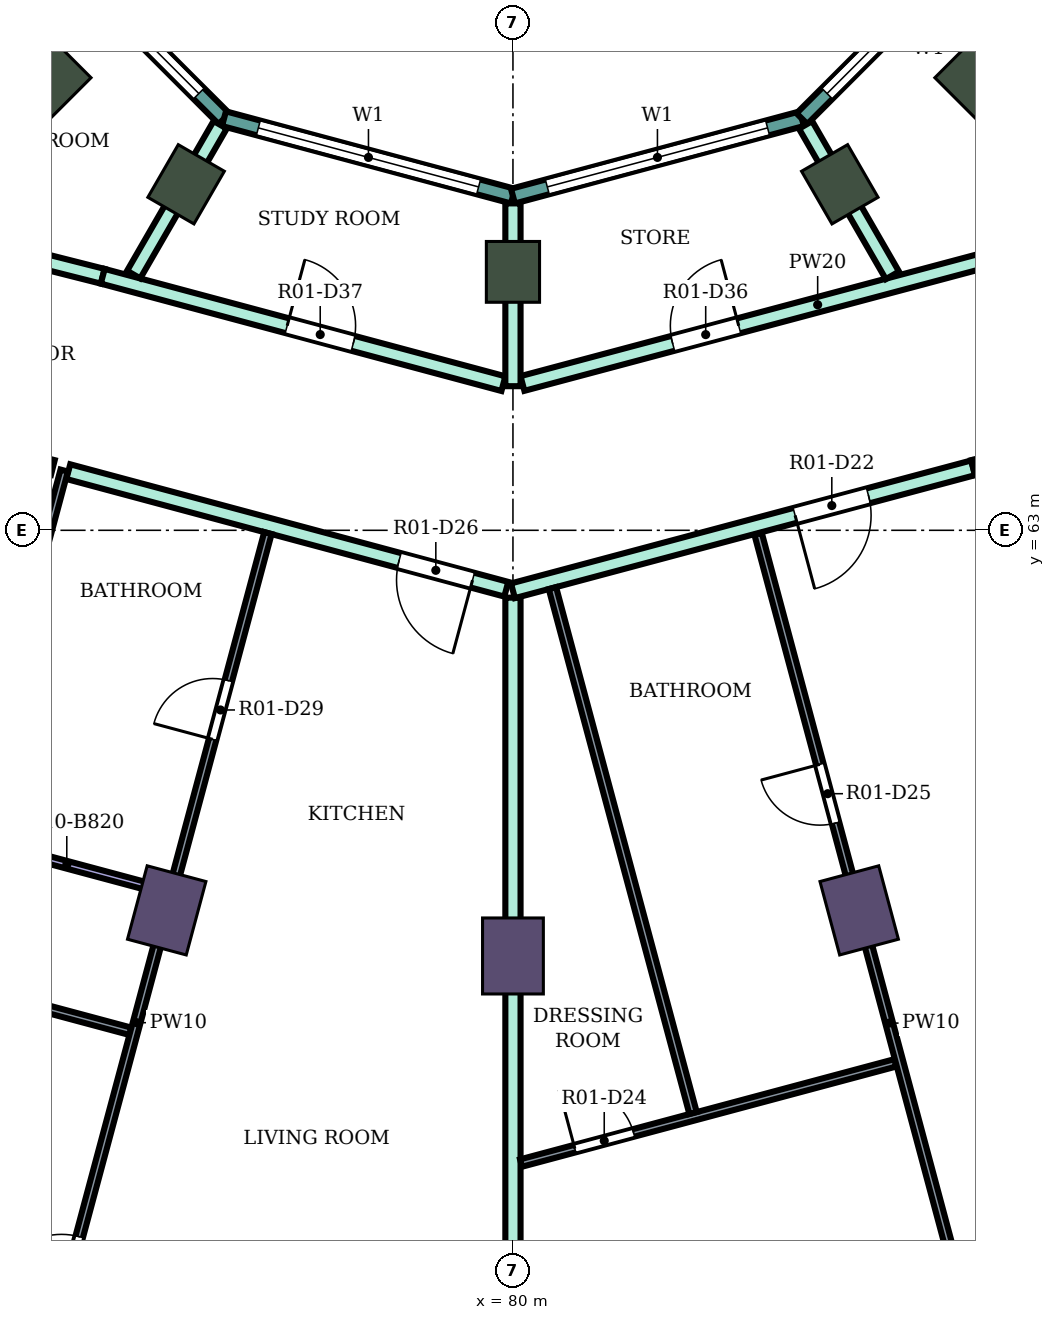
"""IFC4 building model, lengths in metres.
Left out: names, types, materials, properties, quantities, classifications, styles, units other than length and angle.
Written with IfcOpenShell. Run it as: python <this file> out.ifc"""

import sys

from ifc_helpers import new_model, si_unit, direction, frame, frame_2d, origin, origin_2d, place, context, subcontext, project, spatial, rectangle, extrude, element, fill, save


model = new_model("IFC4")
c1 = context("Model", 3, precision=1e-05, world=origin(), true_north=direction((0.0, 1.0)))
c2 = subcontext(c1, "Body", "Model", "MODEL_VIEW")
j1 = project(units=[si_unit("LENGTHUNIT", "METRE"), si_unit("PLANEANGLEUNIT", "RADIAN")], contexts=[c1])
p1 = place(None, origin())
s1 = spatial("IfcSite", under=j1, at=p1, CompositionType="ELEMENT")
p2 = place(p1, origin())
s2 = spatial("IfcBuilding", under=s1, at=p2, CompositionType="ELEMENT")
p3 = place(p2, frame((0.0, 0.0, 161.8)))
s3 = spatial("IfcBuildingStorey", under=s2, at=p3, CompositionType="ELEMENT", Elevation=161.8)
for number, where, z_axis, x_axis in (
    (1, (75.445, 58.0, 0.0), (0.0, 0.0, 1.0), (-0.259, -0.966, 0.0)),
    (2, (80.0, 57.4, 0.0), (0.0, 0.0, 1.0), (0.0, -1.0, 0.0)),
    (3, (84.555, 58.0, 0.0), (0.0, 0.0, 1.0), (0.259, -0.966, 0.0)),
):
    element("IfcColumn", number, at=place(p3, frame(where, z_axis=z_axis, x_axis=x_axis)), inside=s3, PredefinedType="COLUMN", context=c2, shape_type="SweptSolid", body=[
        extrude(rectangle(XDim=1.0, YDim=0.8, at=origin_2d()), origin(), (0.0, 0.0, 1.0), 4.1),
    ])
for number, where, z_axis, x_axis in (
    (4, (73.919, 68.919, 0.0), (0.0, 0.0, 1.0), (-0.707, -0.707, 0.0)),
    (5, (75.7, 67.552, 0.0), (0.0, 0.0, 1.0), (-0.5, -0.866, 0.0)),
    (6, (80.0, 66.4, 0.0), (0.0, 0.0, 1.0), (0.0, -1.0, 0.0)),
    (7, (84.3, 67.552, 0.0), (0.0, 0.0, 1.0), (0.5, -0.866, 0.0)),
    (8, (86.081, 68.919, 0.0), (0.0, 0.0, 1.0), (0.707, -0.707, 0.0)),
):
    element("IfcColumn", number, at=place(p3, frame(where, z_axis=z_axis, x_axis=x_axis)), inside=s3, PredefinedType="COLUMN", context=c2, shape_type="SweptSolid", body=[
        extrude(rectangle(XDim=0.8, YDim=0.7, at=origin_2d()), origin(), (0.0, 0.0, 1.0), 4.1),
    ])
p4 = place(p3, frame((73.415, 71.198, 0.0), z_axis=(0.0, 0.0, 1.0), x_axis=(0.707106781187, -0.707106781187, 0.0)))
e9 = element("IfcWall", 9, at=p4, inside=s3, PredefinedType="NOTDEFINED", context=c2, shape_type="SweptSolid", body=[
    extrude(rectangle(XDim=3.936, YDim=0.2, at=frame_2d((1.968, 0.0))), origin(), (0.0, 0.0, 1.0), 4.1),
])
p5 = place(p4, frame((0.468, 0.0, 0.9)))
e10 = element("IfcOpeningElement", 10, at=p5, cuts=e9, PredefinedType="OPENING", context=c2, shape_type="SweptSolid", body=[
    extrude(rectangle(XDim=3.0, YDim=2.3, at=frame_2d((1.5, 1.15))), frame((0.0, 0.11, 0.0), z_axis=(0.0, -1.0, 0.0), x_axis=(1.0, 0.0, 0.0)), (0.0, 0.0, 1.0), 0.22),
])
p6 = place(p3, frame((76.198, 68.415, 0.0), z_axis=(0.0, 0.0, 1.0), x_axis=(0.965933654434, -0.258789828301, 0.0)))
e11 = element("IfcWall", 11, at=p6, inside=s3, PredefinedType="NOTDEFINED", context=c2, shape_type="SweptSolid", body=[
    extrude(rectangle(XDim=3.936, YDim=0.2, at=frame_2d((1.968, 0.0))), origin(), (0.0, 0.0, 1.0), 4.1),
])
p7 = place(p6, frame((0.468, 0.0, 0.9)))
e12 = element("IfcOpeningElement", 12, at=p7, cuts=e11, PredefinedType="OPENING", context=c2, shape_type="SweptSolid", body=[
    extrude(rectangle(XDim=3.0, YDim=2.3, at=frame_2d((1.5, 1.15))), frame((0.0, 0.11, 0.0), z_axis=(0.0, -1.0, 0.0), x_axis=(1.0, 0.0, 0.0)), (0.0, 0.0, 1.0), 0.22),
])
p8 = place(p3, frame((80.0, 67.396, 0.0), z_axis=(0.0, 0.0, 1.0), x_axis=(0.965933654434, 0.258789828301, 0.0)))
e13 = element("IfcWall", 13, at=p8, inside=s3, PredefinedType="NOTDEFINED", context=c2, shape_type="SweptSolid", body=[
    extrude(rectangle(XDim=3.936, YDim=0.2, at=frame_2d((1.968, 0.0))), origin(), (0.0, 0.0, 1.0), 4.1),
])
p9 = place(p8, frame((0.468, 0.0, 0.9)))
e14 = element("IfcOpeningElement", 14, at=p9, cuts=e13, PredefinedType="OPENING", context=c2, shape_type="SweptSolid", body=[
    extrude(rectangle(XDim=3.0, YDim=2.3, at=frame_2d((1.5, 1.15))), frame((0.0, 0.11, 0.0), z_axis=(0.0, -1.0, 0.0), x_axis=(1.0, 0.0, 0.0)), (0.0, 0.0, 1.0), 0.22),
])
p10 = place(p3, frame((83.802, 68.415, 0.0), z_axis=(0.0, 0.0, 1.0), x_axis=(0.707106781187, 0.707106781187, 0.0)))
e15 = element("IfcWall", 15, at=p10, inside=s3, PredefinedType="NOTDEFINED", context=c2, shape_type="SweptSolid", body=[
    extrude(rectangle(XDim=3.936, YDim=0.2, at=frame_2d((1.968, 0.0))), origin(), (0.0, 0.0, 1.0), 4.1),
])
p11 = place(p10, frame((0.468, 0.0, 0.9)))
e16 = element("IfcOpeningElement", 16, at=p11, cuts=e15, PredefinedType="OPENING", context=c2, shape_type="SweptSolid", body=[
    extrude(rectangle(XDim=3.0, YDim=2.3, at=frame_2d((1.5, 1.15))), frame((0.0, 0.11, 0.0), z_axis=(0.0, -1.0, 0.0), x_axis=(1.0, 0.0, 0.0)), (0.0, 0.0, 1.0), 0.22),
])
p12 = place(p3, frame((68.2, 65.28, 0.0), z_axis=(0.0, 0.0, 1.0), x_axis=(0.969450596516, -0.245286650503, 0.0)))
e17 = element("IfcWall", 17, at=p12, inside=s3, PredefinedType="PARTITIONING", context=c2, shape_type="SweptSolid", body=[
    extrude(rectangle(XDim=5.928, YDim=0.2, at=frame_2d((2.964, 0.0))), origin(), (0.0, 0.0, 1.0), 3.65),
])
p13 = place(p3, frame((72.1, 66.975, 0.0), z_axis=(0.0, 0.0, 1.0), x_axis=(0.969471314457, -0.245204752086, 0.0)))
e18 = element("IfcWall", 18, at=p13, inside=s3, PredefinedType="PARTITIONING", context=c2, shape_type="SweptSolid", body=[
    extrude(rectangle(XDim=2.582, YDim=0.2, at=frame_2d((1.291, 0.0))), origin(), (0.0, 0.0, 1.0), 3.65),
])
p14 = place(p13, frame((0.841, 0.0, 0.0)))
e19 = element("IfcOpeningElement", 19, at=p14, cuts=e18, PredefinedType="OPENING", context=c2, shape_type="SweptSolid", body=[
    extrude(rectangle(XDim=0.9, YDim=2.1, at=frame_2d((0.45, 1.05))), frame((0.0, 0.11, 0.0), z_axis=(0.0, -1.0, 0.0), x_axis=(1.0, 0.0, 0.0)), (0.0, 0.0, 1.0), 0.22),
])
p15 = place(p3, frame((74.15, 63.772, 0.0), z_axis=(0.0, 0.0, 1.0), x_axis=(0.965807109237, -0.259261697417, 0.0)))
e20 = element("IfcWall", 20, at=p15, inside=s3, PredefinedType="PARTITIONING", context=c2, shape_type="SweptSolid", body=[
    extrude(rectangle(XDim=5.967, YDim=0.2, at=frame_2d((2.983, 0.0))), origin(), (0.0, 0.0, 1.0), 3.65),
])
p16 = place(p15, frame((4.507, 0.0, 0.0)))
e21 = element("IfcOpeningElement", 21, at=p16, cuts=e20, PredefinedType="OPENING", context=c2, shape_type="SweptSolid", body=[
    extrude(rectangle(XDim=1.0, YDim=2.1, at=frame_2d((0.5, 1.05))), frame((0.0, 0.11, 0.0), z_axis=(0.0, -1.0, 0.0), x_axis=(1.0, 0.0, 0.0)), (0.0, 0.0, 1.0), 0.22),
])
p17 = place(p3, frame((74.603, 66.342, 0.0), z_axis=(0.0, 0.0, 1.0), x_axis=(0.965920893652, -0.258837453254, 0.0)))
e22 = element("IfcWall", 22, at=p17, inside=s3, PredefinedType="PARTITIONING", context=c2, shape_type="SweptSolid", body=[
    extrude(rectangle(XDim=5.458, YDim=0.2, at=frame_2d((2.729, 0.0))), origin(), (0.0, 0.0, 1.0), 3.65),
])
p18 = place(p17, frame((2.512, 0.0, 0.0)))
e23 = element("IfcOpeningElement", 23, at=p18, cuts=e22, PredefinedType="OPENING", context=c2, shape_type="SweptSolid", body=[
    extrude(rectangle(XDim=0.9, YDim=2.1, at=frame_2d((0.45, 1.05))), frame((0.0, 0.11, 0.0), z_axis=(0.0, -1.0, 0.0), x_axis=(1.0, 0.0, 0.0)), (0.0, 0.0, 1.0), 0.22),
])
p19 = place(p3, frame((75.01, 66.364, 0.0), z_axis=(0.0, 0.0, 1.0), x_axis=(0.50017749597, 0.865922902183, 0.0)))
e24 = element("IfcWall", 24, at=p19, inside=s3, PredefinedType="PARTITIONING", context=c2, shape_type="SweptSolid", body=[
    extrude(rectangle(XDim=2.276, YDim=0.2, at=frame_2d((1.138, 0.0))), origin(), (0.0, 0.0, 1.0), 3.65),
])
p20 = place(p3, frame((80.125, 64.932, 0.0), z_axis=(0.0, 0.0, 1.0), x_axis=(0.966236955806, 0.257655089674, 0.0)))
e25 = element("IfcWall", 25, at=p20, inside=s3, PredefinedType="PARTITIONING", context=c2, shape_type="SweptSolid", body=[
    extrude(rectangle(XDim=8.039, YDim=0.2, at=frame_2d((4.02, 0.0))), origin(), (0.0, 0.0, 1.0), 3.65),
])
p21 = place(p20, frame((6.298, 0.0, 0.0)))
e26 = element("IfcOpeningElement", 26, at=p21, cuts=e25, PredefinedType="OPENING", context=c2, shape_type="SweptSolid", body=[
    extrude(rectangle(XDim=0.9, YDim=2.1, at=frame_2d((0.45, 1.05))), frame((0.0, 0.11, 0.0), z_axis=(0.0, -1.0, 0.0), x_axis=(1.0, 0.0, 0.0)), (0.0, 0.0, 1.0), 0.22),
])
p22 = place(p20, frame((2.045, 0.0, 0.0)))
e27 = element("IfcOpeningElement", 27, at=p22, cuts=e25, PredefinedType="OPENING", context=c2, shape_type="SweptSolid", body=[
    extrude(rectangle(XDim=0.9, YDim=2.1, at=frame_2d((0.45, 1.05))), frame((0.0, 0.11, 0.0), z_axis=(0.0, -1.0, 0.0), x_axis=(1.0, 0.0, 0.0)), (0.0, 0.0, 1.0), 0.22),
])
p23 = place(p3, frame((80.0, 51.8, 0.0), z_axis=(0.0, 0.0, 1.0), x_axis=(0.0, 1.0, 0.0)))
e28 = element("IfcWall", 28, at=p23, inside=s3, PredefinedType="PARTITIONING", context=c2, shape_type="SweptSolid", body=[
    extrude(rectangle(XDim=10.314, YDim=0.2, at=frame_2d((5.157, 0.0))), origin(), (0.0, 0.0, 1.0), 3.65),
])
p24 = place(p3, frame((80.0, 62.205, 0.0), z_axis=(0.0, 0.0, 1.0), x_axis=(0.966104192593, 0.258152453124, 0.0)))
e29 = element("IfcWall", 29, at=p24, inside=s3, PredefinedType="PARTITIONING", context=c2, shape_type="SweptSolid", body=[
    extrude(rectangle(XDim=6.266, YDim=0.2, at=frame_2d((3.133, 0.0))), origin(), (0.0, 0.0, 1.0), 3.65),
])
p25 = place(p24, frame((3.842, 0.0, 0.0)))
e30 = element("IfcOpeningElement", 30, at=p25, cuts=e29, PredefinedType="OPENING", context=c2, shape_type="SweptSolid", body=[
    extrude(rectangle(XDim=1.0, YDim=2.1, at=frame_2d((0.5, 1.05))), frame((0.0, 0.11, 0.0), z_axis=(0.0, -1.0, 0.0), x_axis=(1.0, 0.0, 0.0)), (0.0, 0.0, 1.0), 0.22),
])
p26 = place(p3, frame((80.0, 64.896, 0.0), z_axis=(0.0, 0.0, 1.0), x_axis=(0.0, 1.0, 0.0)))
e31 = element("IfcWall", 31, at=p26, inside=s3, PredefinedType="PARTITIONING", context=c2, shape_type="SweptSolid", body=[
    extrude(rectangle(XDim=2.405, YDim=0.2, at=frame_2d((1.203, 0.0))), origin(), (0.0, 0.0, 1.0), 3.65),
])
p27 = place(p3, frame((83.85, 68.333, 0.0), z_axis=(0.0, 0.0, 1.0), x_axis=(0.499953638813, -0.866052168773, 0.0)))
e32 = element("IfcWall", 32, at=p27, inside=s3, PredefinedType="PARTITIONING", context=c2, shape_type="SweptSolid", body=[
    extrude(rectangle(XDim=2.285, YDim=0.2, at=frame_2d((1.143, 0.0))), origin(), (0.0, 0.0, 1.0), 3.65),
])
p28 = place(p3, frame((86.053, 63.826, 0.0), z_axis=(0.0, 0.0, 1.0), x_axis=(0.969490004987, 0.245130843083, 0.0)))
e33 = element("IfcWall", 33, at=p28, inside=s3, PredefinedType="PARTITIONING", context=c2, shape_type="SweptSolid", body=[
    extrude(rectangle(XDim=5.908, YDim=0.2, at=frame_2d((2.954, 0.0))), origin(), (0.0, 0.0, 1.0), 3.65),
])
p29 = place(p3, frame((70.088, 57.717, 0.0), z_axis=(0.0, 0.0, 1.0), x_axis=(0.965906836082, -0.258889907124, 0.0)))
e34 = element("IfcWall", 34, at=p29, inside=s3, PredefinedType="PARTITIONING", context=c2, shape_type="SweptSolid", body=[
    extrude(rectangle(XDim=5.051, YDim=0.1, at=frame_2d((2.525, 0.0))), origin(), (0.0, 0.0, 1.0), 3.65),
])
p30 = place(p29, frame((2.121, 0.0, 0.0)))
e35 = element("IfcOpeningElement", 35, at=p30, cuts=e34, PredefinedType="OPENING", context=c2, shape_type="SweptSolid", body=[
    extrude(rectangle(XDim=0.8, YDim=2.1, at=frame_2d((0.4, 1.05))), frame((0.0, 0.06, 0.0), z_axis=(0.0, -1.0, 0.0), x_axis=(1.0, 0.0, 0.0)), (0.0, 0.0, 1.0), 0.12),
])
p31 = place(p3, frame((72.815, 59.004, 0.0), z_axis=(0.0, 0.0, 1.0), x_axis=(0.25878292514, 0.96593550388, 0.0)))
e36 = element("IfcWall", 36, at=p31, inside=s3, PredefinedType="PARTITIONING", context=c2, shape_type="SweptSolid", body=[
    extrude(rectangle(XDim=4.95, YDim=0.1, at=frame_2d((2.475, 0.0))), origin(), (0.0, 0.0, 1.0), 3.65),
])
p32 = place(p3, frame((72.802, 58.956, 0.0), z_axis=(0.0, 0.0, 1.0), x_axis=(0.965887802097, -0.258960911647, 0.0)))
e37 = element("IfcWall", 37, at=p32, inside=s3, PredefinedType="PARTITIONING", context=c2, shape_type="SweptSolid", body=[
    extrude(rectangle(XDim=2.75, YDim=0.1, at=frame_2d((1.375, 0.0))), origin(), (0.0, 0.0, 1.0), 3.28),
])
p33 = place(p3, frame((73.322, 50.081, 0.0), z_axis=(0.0, 0.0, 1.0), x_axis=(0.258982801816, 0.965881932931, 0.0)))
e38 = element("IfcWall", 38, at=p33, inside=s3, PredefinedType="PARTITIONING", context=c2, shape_type="SweptSolid", body=[
    extrude(rectangle(XDim=13.338, YDim=0.1, at=frame_2d((6.669, 0.0))), origin(), (0.0, 0.0, 1.0), 3.65),
])
p34 = place(p33, frame((2.854, 0.0, 0.0)))
e39 = element("IfcOpeningElement", 39, at=p34, cuts=e38, PredefinedType="OPENING", context=c2, shape_type="SweptSolid", body=[
    extrude(rectangle(XDim=0.9, YDim=2.1, at=frame_2d((0.45, 1.05))), frame((0.0, 0.06, 0.0), z_axis=(0.0, -1.0, 0.0), x_axis=(1.0, 0.0, 0.0)), (0.0, 0.0, 1.0), 0.12),
])
p35 = place(p33, frame((10.528, 0.0, 0.0)))
e40 = element("IfcOpeningElement", 40, at=p35, cuts=e38, PredefinedType="OPENING", context=c2, shape_type="SweptSolid", body=[
    extrude(rectangle(XDim=0.8, YDim=2.1, at=frame_2d((0.4, 1.05))), frame((0.0, 0.06, 0.0), z_axis=(0.0, -1.0, 0.0), x_axis=(1.0, 0.0, 0.0)), (0.0, 0.0, 1.0), 0.12),
])
p36 = place(p3, frame((80.106, 54.676, 0.0), z_axis=(0.0, 0.0, 1.0), x_axis=(0.965976901679, 0.258628353863, 0.0)))
e41 = element("IfcWall", 41, at=p36, inside=s3, PredefinedType="PARTITIONING", context=c2, shape_type="SweptSolid", body=[
    extrude(rectangle(XDim=5.097, YDim=0.1, at=frame_2d((2.549, 0.0))), origin(), (0.0, 0.0, 1.0), 3.65),
])
p37 = place(p36, frame((0.733, 0.0, 0.0)))
e42 = element("IfcOpeningElement", 42, at=p37, cuts=e41, PredefinedType="OPENING", context=c2, shape_type="SweptSolid", body=[
    extrude(rectangle(XDim=0.8, YDim=2.1, at=frame_2d((0.4, 1.05))), frame((0.0, 0.06, 0.0), z_axis=(0.0, -1.0, 0.0), x_axis=(1.0, 0.0, 0.0)), (0.0, 0.0, 1.0), 0.12),
])
p38 = place(p3, frame((80.519, 62.239, 0.0), z_axis=(0.0, 0.0, 1.0), x_axis=(0.25878046533, -0.965936162882, 0.0)))
e43 = element("IfcWall", 43, at=p38, inside=s3, PredefinedType="PARTITIONING", context=c2, shape_type="SweptSolid", body=[
    extrude(rectangle(XDim=7.149, YDim=0.1, at=frame_2d((3.575, 0.0))), origin(), (0.0, 0.0, 1.0), 3.65),
])
p39 = place(p3, frame((83.225, 62.954, 0.0), z_axis=(0.0, 0.0, 1.0), x_axis=(0.258715941946, -0.965953446799, 0.0)))
e44 = element("IfcWall", 44, at=p39, inside=s3, PredefinedType="PARTITIONING", context=c2, shape_type="SweptSolid", body=[
    extrude(rectangle(XDim=13.328, YDim=0.1, at=frame_2d((6.664, 0.0))), origin(), (0.0, 0.0, 1.0), 3.65),
])
p40 = place(p39, frame((9.784, 0.0, 0.0)))
e45 = element("IfcOpeningElement", 45, at=p40, cuts=e44, PredefinedType="OPENING", context=c2, shape_type="SweptSolid", body=[
    extrude(rectangle(XDim=0.9, YDim=2.1, at=frame_2d((0.45, 1.05))), frame((0.0, 0.06, 0.0), z_axis=(0.0, -1.0, 0.0), x_axis=(1.0, 0.0, 0.0)), (0.0, 0.0, 1.0), 0.12),
])
p41 = place(p39, frame((3.14, 0.0, 0.0)))
e46 = element("IfcOpeningElement", 46, at=p41, cuts=e44, PredefinedType="OPENING", context=c2, shape_type="SweptSolid", body=[
    extrude(rectangle(XDim=0.8, YDim=2.1, at=frame_2d((0.4, 1.05))), frame((0.0, 0.06, 0.0), z_axis=(0.0, -1.0, 0.0), x_axis=(1.0, 0.0, 0.0)), (0.0, 0.0, 1.0), 0.12),
])
p42 = place(p5, origin())
e47 = element("IfcWindow", 47, at=p42, inside=s3, PartitioningType="SINGLE_PANEL", PredefinedType="WINDOW", context=c2, shape_type="SweptSolid", body=[
    extrude(rectangle(XDim=3.0, YDim=2.3, at=frame_2d((1.5, 1.15))), frame((0.0, 0.03, 0.0), z_axis=(0.0, -1.0, 0.0), x_axis=(1.0, 0.0, 0.0)), (0.0, 0.0, 1.0), 0.06),
])
fill(e10, e47)
p43 = place(p7, origin())
e48 = element("IfcWindow", 48, at=p43, inside=s3, PartitioningType="SINGLE_PANEL", PredefinedType="WINDOW", context=c2, shape_type="SweptSolid", body=[
    extrude(rectangle(XDim=3.0, YDim=2.3, at=frame_2d((1.5, 1.15))), frame((0.0, 0.03, 0.0), z_axis=(0.0, -1.0, 0.0), x_axis=(1.0, 0.0, 0.0)), (0.0, 0.0, 1.0), 0.06),
])
fill(e12, e48)
p44 = place(p9, origin())
e49 = element("IfcWindow", 49, at=p44, inside=s3, PartitioningType="SINGLE_PANEL", PredefinedType="WINDOW", context=c2, shape_type="SweptSolid", body=[
    extrude(rectangle(XDim=3.0, YDim=2.3, at=frame_2d((1.5, 1.15))), frame((0.0, 0.03, 0.0), z_axis=(0.0, -1.0, 0.0), x_axis=(1.0, 0.0, 0.0)), (0.0, 0.0, 1.0), 0.06),
])
fill(e14, e49)
p45 = place(p11, origin())
e50 = element("IfcWindow", 50, at=p45, inside=s3, PartitioningType="SINGLE_PANEL", PredefinedType="WINDOW", context=c2, shape_type="SweptSolid", body=[
    extrude(rectangle(XDim=3.0, YDim=2.3, at=frame_2d((1.5, 1.15))), frame((0.0, 0.03, 0.0), z_axis=(0.0, -1.0, 0.0), x_axis=(1.0, 0.0, 0.0)), (0.0, 0.0, 1.0), 0.06),
])
fill(e16, e50)
p46 = place(p25, frame((1.0, 0.0, 0.0), z_axis=(0.0, 0.0, 1.0), x_axis=(-1.0, 0.0, 0.0)))
e51 = element("IfcDoor", 51, at=p46, inside=s3, OperationType="SINGLE_SWING_RIGHT", PredefinedType="DOOR", context=c2, shape_type="SweptSolid", body=[
    extrude(rectangle(XDim=1.0, YDim=2.1, at=frame_2d((0.5, 1.05))), frame((0.0, 0.025, 0.0), z_axis=(0.0, -1.0, 0.0), x_axis=(1.0, 0.0, 0.0)), (0.0, 0.0, 1.0), 0.05),
])
fill(e30, e51)
p47 = place(p37, origin())
e52 = element("IfcDoor", 52, at=p47, inside=s3, OperationType="SINGLE_SWING_LEFT", PredefinedType="DOOR", context=c2, shape_type="SweptSolid", body=[
    extrude(rectangle(XDim=0.8, YDim=2.1, at=frame_2d((0.4, 1.05))), frame((0.0, 0.025, 0.0), z_axis=(0.0, -1.0, 0.0), x_axis=(1.0, 0.0, 0.0)), (0.0, 0.0, 1.0), 0.05),
])
fill(e42, e52)
p48 = place(p41, frame((0.8, 0.0, 0.0), z_axis=(0.0, 0.0, 1.0), x_axis=(-1.0, 0.0, 0.0)))
e53 = element("IfcDoor", 53, at=p48, inside=s3, OperationType="SINGLE_SWING_RIGHT", PredefinedType="DOOR", context=c2, shape_type="SweptSolid", body=[
    extrude(rectangle(XDim=0.8, YDim=2.1, at=frame_2d((0.4, 1.05))), frame((0.0, 0.025, 0.0), z_axis=(0.0, -1.0, 0.0), x_axis=(1.0, 0.0, 0.0)), (0.0, 0.0, 1.0), 0.05),
])
fill(e46, e53)
p49 = place(p16, frame((1.0, 0.0, 0.0), z_axis=(0.0, 0.0, 1.0), x_axis=(-1.0, 0.0, 0.0)))
e54 = element("IfcDoor", 54, at=p49, inside=s3, OperationType="SINGLE_SWING_LEFT", PredefinedType="DOOR", context=c2, shape_type="SweptSolid", body=[
    extrude(rectangle(XDim=1.0, YDim=2.1, at=frame_2d((0.5, 1.05))), frame((0.0, 0.025, 0.0), z_axis=(0.0, -1.0, 0.0), x_axis=(1.0, 0.0, 0.0)), (0.0, 0.0, 1.0), 0.05),
])
fill(e21, e54)
p50 = place(p34, origin())
e55 = element("IfcDoor", 55, at=p50, inside=s3, OperationType="SINGLE_SWING_LEFT", PredefinedType="DOOR", context=c2, shape_type="SweptSolid", body=[
    extrude(rectangle(XDim=0.9, YDim=2.1, at=frame_2d((0.45, 1.05))), frame((0.0, 0.025, 0.0), z_axis=(0.0, -1.0, 0.0), x_axis=(1.0, 0.0, 0.0)), (0.0, 0.0, 1.0), 0.05),
])
fill(e39, e55)
p51 = place(p35, origin())
e56 = element("IfcDoor", 56, at=p51, inside=s3, OperationType="SINGLE_SWING_LEFT", PredefinedType="DOOR", context=c2, shape_type="SweptSolid", body=[
    extrude(rectangle(XDim=0.8, YDim=2.1, at=frame_2d((0.4, 1.05))), frame((0.0, 0.025, 0.0), z_axis=(0.0, -1.0, 0.0), x_axis=(1.0, 0.0, 0.0)), (0.0, 0.0, 1.0), 0.05),
])
fill(e40, e56)
p52 = place(p22, origin())
e57 = element("IfcDoor", 57, at=p52, inside=s3, OperationType="SINGLE_SWING_RIGHT", PredefinedType="DOOR", context=c2, shape_type="SweptSolid", body=[
    extrude(rectangle(XDim=0.9, YDim=2.1, at=frame_2d((0.45, 1.05))), frame((0.0, 0.025, 0.0), z_axis=(0.0, -1.0, 0.0), x_axis=(1.0, 0.0, 0.0)), (0.0, 0.0, 1.0), 0.05),
])
fill(e27, e57)
p53 = place(p18, origin())
e58 = element("IfcDoor", 58, at=p53, inside=s3, OperationType="SINGLE_SWING_LEFT", PredefinedType="DOOR", context=c2, shape_type="SweptSolid", body=[
    extrude(rectangle(XDim=0.9, YDim=2.1, at=frame_2d((0.45, 1.05))), frame((0.0, 0.025, 0.0), z_axis=(0.0, -1.0, 0.0), x_axis=(1.0, 0.0, 0.0)), (0.0, 0.0, 1.0), 0.05),
])
fill(e23, e58)
save(model, sys.argv[1])
